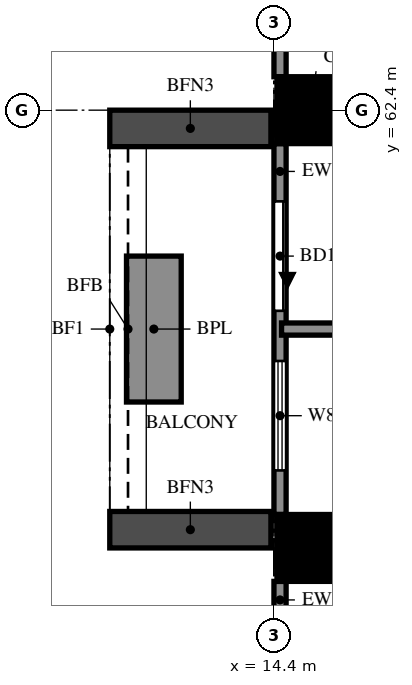
"""IFC4 building model, lengths in metres.
Left out: names, types, materials, properties, quantities, classifications, styles, units other than length and angle.
Written with IfcOpenShell. Run it as: python <this file> out.ifc"""

import sys

from ifc_helpers import new_model, si_unit, direction, frame, frame_2d, origin, origin_2d, place, context, subcontext, project, spatial, rectangle, extrude, source, transform, mapped, element, fill, save


model = new_model("IFC4")
c1 = context("Model", 3, precision=1e-05, world=origin(), true_north=direction((0.0, 1.0)))
c2 = subcontext(c1, "Body", "Model", "MODEL_VIEW")
j1 = project(units=[si_unit("LENGTHUNIT", "METRE"), si_unit("PLANEANGLEUNIT", "RADIAN")], contexts=[c1])
p1 = place(None, origin())
s1 = spatial("IfcSite", under=j1, at=p1, CompositionType="ELEMENT")
p2 = place(p1, origin())
s2 = spatial("IfcBuilding", under=s1, at=p2, CompositionType="ELEMENT")
p3 = place(p2, frame((0.0, 0.0, 48.0)))
s3 = spatial("IfcBuildingStorey", under=s2, at=p3, CompositionType="ELEMENT", Elevation=48.0)
m1 = source(origin(), c2, "Body", "SweptSolid", [
    extrude(rectangle(XDim=1.1, YDim=1.1, at=origin_2d()), origin(), (0.0, 0.0, 1.0), 3.18),
])
for number, where, z_axis, x_axis in (
    (1, (15.0, 55.2, 0.0), (0.0, 0.0, 1.0), (1.0, 0.0, 0.0)),
    (2, (15.0, 62.4, 0.0), (0.0, 0.0, 1.0), (1.0, 0.0, 0.0)),
):
    element("IfcColumn", number, at=place(p3, frame(where, z_axis=z_axis, x_axis=x_axis)), inside=s3, PredefinedType="COLUMN", context=c2, shape_type="MappedRepresentation", body=[
        mapped(m1, transform((0.0, 0.0, 0.0))),
    ])
p4 = place(p3, frame((14.5, 69.05, 0.0), z_axis=(0.0, 0.0, 1.0), x_axis=(0.0, -1.0, 0.0)))
e3 = element("IfcWall", 3, at=p4, inside=s3, PredefinedType="SOLIDWALL", context=c2, shape_type="SweptSolid", body=[
    extrude(rectangle(XDim=6.1, YDim=0.2, at=frame_2d((3.05, 0.0))), origin(), (0.0, 0.0, 1.0), 3.18),
])
p5 = place(p4, frame((1.85, 0.0, 0.6)))
e4 = element("IfcOpeningElement", 4, at=p5, cuts=e3, PredefinedType="OPENING", context=c2, shape_type="SweptSolid", body=[
    extrude(rectangle(XDim=2.4, YDim=2.4, at=frame_2d((1.2, 1.2))), frame((0.0, 0.11, 0.0), z_axis=(0.0, -1.0, 0.0), x_axis=(1.0, 0.0, 0.0)), (0.0, 0.0, 1.0), 0.22),
])
p6 = place(p3, frame((14.5, 61.85, 0.0), z_axis=(0.0, 0.0, 1.0), x_axis=(0.0, -1.0, 0.0)))
e5 = element("IfcWall", 5, at=p6, inside=s3, PredefinedType="SOLIDWALL", context=c2, shape_type="SweptSolid", body=[
    extrude(rectangle(XDim=6.1, YDim=0.2, at=frame_2d((3.05, 0.0))), origin(), (0.0, 0.0, 1.0), 3.18),
])
p7 = place(p6, frame((0.95, 0.0, 0.0)))
e6 = element("IfcOpeningElement", 6, at=p7, cuts=e5, PredefinedType="OPENING", context=c2, shape_type="SweptSolid", body=[
    extrude(rectangle(XDim=1.8, YDim=2.4, at=frame_2d((0.9, 1.2))), frame((0.0, 0.11, 0.0), z_axis=(0.0, -1.0, 0.0), x_axis=(1.0, 0.0, 0.0)), (0.0, 0.0, 1.0), 0.22),
])
p8 = place(p6, frame((3.575, 0.0, 0.6)))
e7 = element("IfcOpeningElement", 7, at=p8, cuts=e5, PredefinedType="OPENING", context=c2, shape_type="SweptSolid", body=[
    extrude(rectangle(XDim=1.8, YDim=2.4, at=frame_2d((0.9, 1.2))), frame((0.0, 0.11, 0.0), z_axis=(0.0, -1.0, 0.0), x_axis=(1.0, 0.0, 0.0)), (0.0, 0.0, 1.0), 0.22),
])
p9 = place(p3, frame((14.5, 54.65, 0.0), z_axis=(0.0, 0.0, 1.0), x_axis=(0.0, -1.0, 0.0)))
e8 = element("IfcWall", 8, at=p9, inside=s3, PredefinedType="SOLIDWALL", context=c2, shape_type="SweptSolid", body=[
    extrude(rectangle(XDim=6.1, YDim=0.2, at=frame_2d((3.05, 0.0))), origin(), (0.0, 0.0, 1.0), 3.18),
])
p10 = place(p9, frame((3.575, 0.0, 0.6)))
e9 = element("IfcOpeningElement", 9, at=p10, cuts=e8, PredefinedType="OPENING", context=c2, shape_type="SweptSolid", body=[
    extrude(rectangle(XDim=1.8, YDim=2.4, at=frame_2d((0.9, 1.2))), frame((0.0, 0.11, 0.0), z_axis=(0.0, -1.0, 0.0), x_axis=(1.0, 0.0, 0.0)), (0.0, 0.0, 1.0), 0.22),
])
p11 = place(p9, frame((0.725, 0.0, 0.6)))
e10 = element("IfcOpeningElement", 10, at=p11, cuts=e8, PredefinedType="OPENING", context=c2, shape_type="SweptSolid", body=[
    extrude(rectangle(XDim=1.8, YDim=2.4, at=frame_2d((0.9, 1.2))), frame((0.0, 0.11, 0.0), z_axis=(0.0, -1.0, 0.0), x_axis=(1.0, 0.0, 0.0)), (0.0, 0.0, 1.0), 0.22),
])
for number, where, z_axis, x_axis in (
    (11, (14.35, 62.1, 0.0), (0.0, 0.0, 1.0), (-1.0, 0.0, 0.0)),
    (12, (14.35, 55.5, 0.0), (0.0, 0.0, 1.0), (-1.0, 0.0, 0.0)),
):
    element("IfcWall", number, at=place(p3, frame(where, z_axis=z_axis, x_axis=x_axis)), inside=s3, PredefinedType="SOLIDWALL", context=c2, shape_type="SweptSolid", body=[
        extrude(rectangle(XDim=2.65, YDim=0.6, at=frame_2d((1.325, 0.0))), origin(), (0.0, 0.0, 1.0), 2.85),
    ])
p12 = place(p3, frame((12.425, 60.0, 0.0), z_axis=(0.0, 0.0, 1.0), x_axis=(0.0, -1.0, 0.0)))
e13 = element("IfcWall", 13, at=p12, inside=s3, PredefinedType="SOLIDWALL", context=c2, shape_type="SweptSolid", body=[
    extrude(rectangle(XDim=2.4, YDim=0.9, at=frame_2d((1.2, 0.0))), origin(), (0.0, 0.0, 1.0), 0.9),
])
p13 = place(p3, frame((14.525, 58.8, 0.0), z_axis=(0.0, 0.0, 1.0), x_axis=(1.0, 0.0, 0.0)))
e14 = element("IfcWall", 14, at=p13, inside=s3, PredefinedType="SOLIDWALL", context=c2, shape_type="SweptSolid", body=[
    extrude(rectangle(XDim=11.875, YDim=0.2, at=frame_2d((5.938, 0.0))), origin(), (0.0, 0.0, 1.0), 2.28),
])
p14 = place(p3, frame((14.525, 62.4, 0.0), z_axis=(0.0, 0.0, 1.0), x_axis=(1.0, 0.0, 0.0)))
e15 = element("IfcWall", 15, at=p14, inside=s3, PredefinedType="PARTITIONING", context=c2, shape_type="SweptSolid", body=[
    extrude(rectangle(XDim=7.075, YDim=0.12, at=frame_2d((3.538, 0.0))), origin(), (0.0, 0.0, 1.0), 3.18),
])
p15 = place(p7, origin())
e16 = element("IfcDoor", 16, at=p15, inside=s3, OperationType="DOUBLE_DOOR_SLIDING", PredefinedType="DOOR", context=c2, shape_type="SweptSolid", body=[
    extrude(rectangle(XDim=1.8, YDim=2.4, at=frame_2d((0.9, 1.2))), frame((0.0, 0.025, 0.0), z_axis=(0.0, -1.0, 0.0), x_axis=(1.0, 0.0, 0.0)), (0.0, 0.0, 1.0), 0.05),
])
fill(e6, e16)
p16 = place(p8, origin())
e17 = element("IfcWindow", 17, at=p16, inside=s3, PartitioningType="DOUBLE_PANEL_VERTICAL", PredefinedType="WINDOW", context=c2, shape_type="SweptSolid", body=[
    extrude(rectangle(XDim=1.8, YDim=2.4, at=frame_2d((0.9, 1.2))), frame((0.0, 0.03, 0.0), z_axis=(0.0, -1.0, 0.0), x_axis=(1.0, 0.0, 0.0)), (0.0, 0.0, 1.0), 0.06),
])
fill(e7, e17)
save(model, sys.argv[1])
